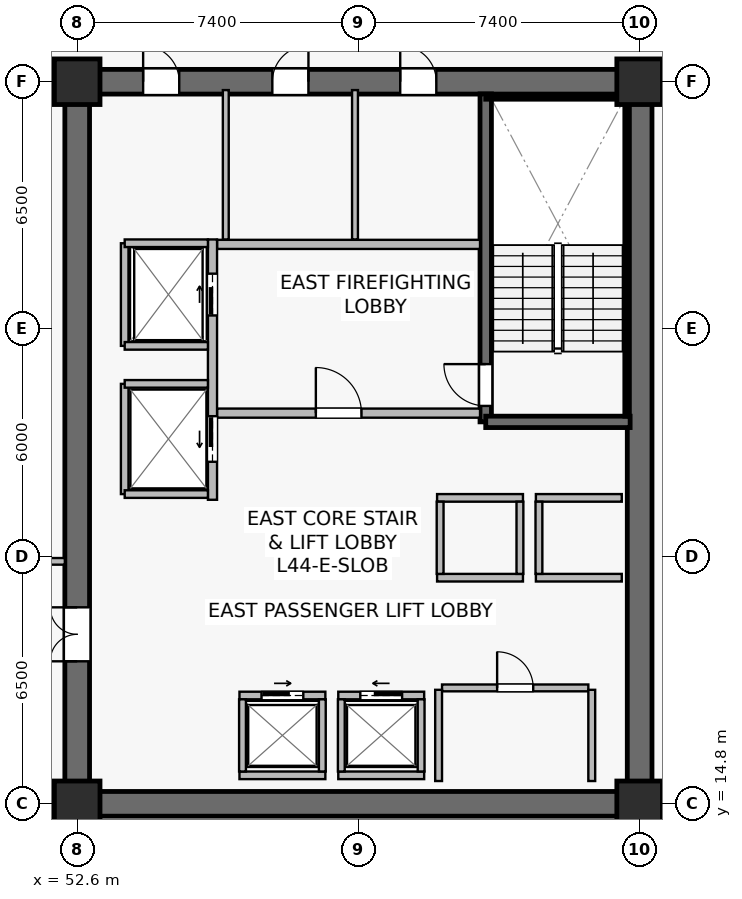
"""IFC4 building model, lengths in metres.
Left out: names, types, materials, properties, quantities, classifications, styles, units other than length and angle.
Written with IfcOpenShell. Run it as: python <this file> out.ifc"""

import sys

from ifc_helpers import new_model, si_unit, direction, frame, frame_2d, origin, origin_2d, place, context, subcontext, project, spatial, rectangle, extrude, source, transform, mapped, element, fill, save


model = new_model("IFC4")
c1 = context("Model", 3, precision=1e-05, world=origin(), true_north=direction((0.0, 1.0)))
c2 = subcontext(c1, "Body", "Model", "MODEL_VIEW")
j1 = project(units=[si_unit("LENGTHUNIT", "METRE"), si_unit("PLANEANGLEUNIT", "RADIAN")], contexts=[c1])
p1 = place(None, origin())
s1 = spatial("IfcSite", under=j1, at=p1, CompositionType="ELEMENT")
p2 = place(p1, origin())
s2 = spatial("IfcBuilding", under=s1, at=p2, CompositionType="ELEMENT")
p3 = place(p2, frame((0.0, 0.0, 183.0)))
s3 = spatial("IfcBuildingStorey", under=s2, at=p3, CompositionType="ELEMENT", Elevation=183.0)
p4 = place(p3, frame((52.275, 14.8, 0.0), z_axis=(0.0, 0.0, 1.0), x_axis=(1.0, 0.0, 0.0)))
e1 = element("IfcWall", 1, at=p4, inside=s3, PredefinedType="SHEAR", context=c2, shape_type="SweptSolid", body=[
    extrude(rectangle(XDim=15.45, YDim=0.65, at=frame_2d((7.725, 0.0))), origin(), (0.0, 0.0, 1.0), 3.79),
])
p5 = place(p3, frame((52.275, 33.8, 0.0), z_axis=(0.0, 0.0, 1.0), x_axis=(1.0, 0.0, 0.0)))
e2 = element("IfcWall", 2, at=p5, inside=s3, PredefinedType="SHEAR", context=c2, shape_type="SweptSolid", body=[
    extrude(rectangle(XDim=15.45, YDim=0.65, at=frame_2d((7.725, 0.0))), origin(), (0.0, 0.0, 1.0), 3.79),
])
p6 = place(p5, frame((8.825, 0.0, 0.0)))
e3 = element("IfcOpeningElement", 3, at=p6, cuts=e2, PredefinedType="OPENING", context=c2, shape_type="SweptSolid", body=[
    extrude(rectangle(XDim=0.95, YDim=2.15, at=frame_2d((0.475, 1.075))), frame((0.0, 0.335, 0.0), z_axis=(0.0, -1.0, 0.0), x_axis=(1.0, 0.0, 0.0)), (0.0, 0.0, 1.0), 0.67),
])
p7 = place(p5, frame((5.46, 0.0, 0.0)))
e4 = element("IfcOpeningElement", 4, at=p7, cuts=e2, PredefinedType="OPENING", context=c2, shape_type="SweptSolid", body=[
    extrude(rectangle(XDim=0.95, YDim=2.15, at=frame_2d((0.475, 1.075))), frame((0.0, 0.335, 0.0), z_axis=(0.0, -1.0, 0.0), x_axis=(1.0, 0.0, 0.0)), (0.0, 0.0, 1.0), 0.67),
])
p8 = place(p5, frame((2.06, 0.0, 0.0)))
e5 = element("IfcOpeningElement", 5, at=p8, cuts=e2, PredefinedType="OPENING", context=c2, shape_type="SweptSolid", body=[
    extrude(rectangle(XDim=0.95, YDim=2.15, at=frame_2d((0.475, 1.075))), frame((0.0, 0.335, 0.0), z_axis=(0.0, -1.0, 0.0), x_axis=(1.0, 0.0, 0.0)), (0.0, 0.0, 1.0), 0.67),
])
p9 = place(p3, frame((52.6, 15.125, 0.0), z_axis=(0.0, 0.0, 1.0), x_axis=(0.0, 1.0, 0.0)))
e6 = element("IfcWall", 6, at=p9, inside=s3, PredefinedType="SHEAR", context=c2, shape_type="SweptSolid", body=[
    extrude(rectangle(XDim=18.35, YDim=0.65, at=frame_2d((9.175, 0.0))), origin(), (0.0, 0.0, 1.0), 3.79),
])
p10 = place(p9, frame((3.425, 0.0, 0.0)))
e7 = element("IfcOpeningElement", 7, at=p10, cuts=e6, PredefinedType="OPENING", context=c2, shape_type="SweptSolid", body=[
    extrude(rectangle(XDim=1.42, YDim=2.2, at=frame_2d((0.71, 1.1))), frame((0.0, 0.335, 0.0), z_axis=(0.0, -1.0, 0.0), x_axis=(1.0, 0.0, 0.0)), (0.0, 0.0, 1.0), 0.67),
])
p11 = place(p3, frame((67.4, 15.125, 0.0), z_axis=(0.0, 0.0, 1.0), x_axis=(0.0, 1.0, 0.0)))
e8 = element("IfcWall", 8, at=p11, inside=s3, PredefinedType="SHEAR", context=c2, shape_type="SweptSolid", body=[
    extrude(rectangle(XDim=18.35, YDim=0.65, at=frame_2d((9.175, 0.0))), origin(), (0.0, 0.0, 1.0), 3.79),
])
p12 = place(p3, frame((63.35, 24.85, 0.0), z_axis=(0.0, 0.0, 1.0), x_axis=(0.0, 1.0, 0.0)))
e9 = element("IfcWall", 9, at=p12, inside=s3, PredefinedType="SHEAR", context=c2, shape_type="SweptSolid", body=[
    extrude(rectangle(XDim=8.63, YDim=0.3, at=frame_2d((4.315, 0.0))), origin(), (0.0, 0.0, 1.0), 3.79),
])
p13 = place(p12, frame((0.42, 0.0, 0.0)))
e10 = element("IfcOpeningElement", 10, at=p13, cuts=e9, PredefinedType="OPENING", context=c2, shape_type="SweptSolid", body=[
    extrude(rectangle(XDim=1.1, YDim=2.15, at=frame_2d((0.55, 1.075))), frame((0.0, 0.16, 0.0), z_axis=(0.0, -1.0, 0.0), x_axis=(1.0, 0.0, 0.0)), (0.0, 0.0, 1.0), 0.32),
])
p14 = place(p3, frame((63.35, 24.85, 0.0), z_axis=(0.0, 0.0, 1.0), x_axis=(1.0, 0.0, 0.0)))
e11 = element("IfcWall", 11, at=p14, inside=s3, PredefinedType="SHEAR", context=c2, shape_type="SweptSolid", body=[
    extrude(rectangle(XDim=3.8, YDim=0.3, at=frame_2d((1.9, 0.0))), origin(), (0.0, 0.0, 1.0), 3.79),
])
p15 = place(p3, frame((63.35, 33.4, 0.0), z_axis=(0.0, 0.0, 1.0), x_axis=(1.0, 0.0, 0.0)))
e12 = element("IfcWall", 12, at=p15, inside=s3, PredefinedType="SOLIDWALL", context=c2, shape_type="SweptSolid", body=[
    extrude(rectangle(XDim=3.72, YDim=0.12, at=frame_2d((1.86, 0.0))), origin(), (0.0, 0.0, 1.0), 3.79),
])
p16 = place(p3, frame((67.07, 25.0, 0.0), z_axis=(0.0, 0.0, 1.0), x_axis=(0.0, 1.0, 0.0)))
e13 = element("IfcWall", 13, at=p16, inside=s3, PredefinedType="SOLIDWALL", context=c2, shape_type="SweptSolid", body=[
    extrude(rectangle(XDim=8.32, YDim=0.12, at=frame_2d((4.16, 0.0))), origin(), (0.0, 0.0, 1.0), 3.79),
])
m1 = source(origin(), c2, "Body", "SweptSolid", [
    extrude(rectangle(XDim=1.2, YDim=1.2, at=origin_2d()), origin(), (0.0, 0.0, 1.0), 4.1),
])
for number, where, z_axis, x_axis in (
    (14, (52.6, 14.8, 0.0), (0.0, 0.0, 1.0), (1.0, 0.0, 0.0)),
    (15, (67.4, 14.8, 0.0), (0.0, 0.0, 1.0), (1.0, 0.0, 0.0)),
    (16, (52.6, 33.8, 0.0), (0.0, 0.0, 1.0), (1.0, 0.0, 0.0)),
    (17, (67.4, 33.8, 0.0), (0.0, 0.0, 1.0), (1.0, 0.0, 0.0)),
):
    element("IfcColumn", number, at=place(p3, frame(where, z_axis=z_axis, x_axis=x_axis)), inside=s3, PredefinedType="COLUMN", context=c2, shape_type="MappedRepresentation", body=[
        mapped(m1, transform((0.0, 0.0, 0.0), scale=1.0)),
    ])
p17 = place(p3, frame((56.28, 25.08, 0.0), z_axis=(0.0, 0.0, 1.0), x_axis=(1.0, 0.0, 0.0)))
e18 = element("IfcWall", 18, at=p17, inside=s3, PredefinedType="SOLIDWALL", context=c2, shape_type="SweptSolid", body=[
    extrude(rectangle(XDim=6.92, YDim=0.24, at=frame_2d((3.46, 0.0))), origin(), (0.0, 0.0, 1.0), 3.187),
])
p18 = place(p17, frame((2.6, 0.0, 0.0)))
e19 = element("IfcOpeningElement", 19, at=p18, cuts=e18, PredefinedType="OPENING", context=c2, shape_type="SweptSolid", body=[
    extrude(rectangle(XDim=1.2, YDim=2.16, at=frame_2d((0.6, 1.08))), frame((0.0, 0.13, 0.0), z_axis=(0.0, -1.0, 0.0), x_axis=(1.0, 0.0, 0.0)), (0.0, 0.0, 1.0), 0.26),
])
p19 = place(p3, frame((56.28, 29.52, 0.0), z_axis=(0.0, 0.0, 1.0), x_axis=(1.0, 0.0, 0.0)))
e20 = element("IfcWall", 20, at=p19, inside=s3, PredefinedType="SOLIDWALL", context=c2, shape_type="SweptSolid", body=[
    extrude(rectangle(XDim=6.92, YDim=0.24, at=frame_2d((3.46, 0.0))), origin(), (0.0, 0.0, 1.0), 3.187),
])
p20 = place(p3, frame((56.16, 22.8, 0.0), z_axis=(0.0, 0.0, 1.0), x_axis=(0.0, 1.0, 0.0)))
e21 = element("IfcWall", 21, at=p20, inside=s3, PredefinedType="SOLIDWALL", context=c2, shape_type="SweptSolid", body=[
    extrude(rectangle(XDim=6.85, YDim=0.24, at=frame_2d((3.425, 0.0))), origin(), (0.0, 0.0, 1.0), 2.925),
])
p21 = place(p20, frame((4.85, 0.0, 0.0)))
e22 = element("IfcOpeningElement", 22, at=p21, cuts=e21, PredefinedType="OPENING", context=c2, shape_type="SweptSolid", body=[
    extrude(rectangle(XDim=1.1, YDim=2.22, at=frame_2d((0.55, 1.11))), frame((0.0, 0.13, 0.0), z_axis=(0.0, -1.0, 0.0), x_axis=(1.0, 0.0, 0.0)), (0.0, 0.0, 1.0), 0.26),
])
p22 = place(p20, frame((1.0, 0.0, 0.0)))
e23 = element("IfcOpeningElement", 23, at=p22, cuts=e21, PredefinedType="OPENING", context=c2, shape_type="SweptSolid", body=[
    extrude(rectangle(XDim=1.2, YDim=2.22, at=frame_2d((0.6, 1.11))), frame((0.0, 0.13, 0.0), z_axis=(0.0, -1.0, 0.0), x_axis=(1.0, 0.0, 0.0)), (0.0, 0.0, 1.0), 0.26),
])
p23 = place(p3, frame((59.47, 17.65, 0.0), z_axis=(0.0, 0.0, 1.0), x_axis=(1.0, 0.0, 0.0)))
e24 = element("IfcWall", 24, at=p23, inside=s3, PredefinedType="SOLIDWALL", context=c2, shape_type="SweptSolid", body=[
    extrude(rectangle(XDim=2.26, YDim=0.2, at=frame_2d((1.13, 0.0))), origin(), (0.0, 0.0, 1.0), 3.187),
])
p24 = place(p23, frame((0.58, 0.0, 0.0)))
e25 = element("IfcOpeningElement", 25, at=p24, cuts=e24, PredefinedType="OPENING", context=c2, shape_type="SweptSolid", body=[
    extrude(rectangle(XDim=1.1, YDim=2.22, at=frame_2d((0.55, 1.11))), frame((0.0, 0.11, 0.0), z_axis=(0.0, -1.0, 0.0), x_axis=(1.0, 0.0, 0.0)), (0.0, 0.0, 1.0), 0.22),
])
p25 = place(p3, frame((59.47, 15.55, 0.0), z_axis=(0.0, 0.0, 1.0), x_axis=(1.0, 0.0, 0.0)))
e26 = element("IfcWall", 26, at=p25, inside=s3, PredefinedType="SOLIDWALL", context=c2, shape_type="SweptSolid", body=[
    extrude(rectangle(XDim=2.26, YDim=0.2, at=frame_2d((1.13, 0.0))), origin(), (0.0, 0.0, 1.0), 3.187),
])
for number, where, z_axis, x_axis in (
    (27, (59.55, 15.65, 0.0), (0.0, 0.0, 1.0), (0.0, 1.0, 0.0)),
    (28, (61.65, 15.65, 0.0), (0.0, 0.0, 1.0), (0.0, 1.0, 0.0)),
):
    element("IfcWall", number, at=place(p3, frame(where, z_axis=z_axis, x_axis=x_axis)), inside=s3, PredefinedType="SOLIDWALL", context=c2, shape_type="SweptSolid", body=[
        extrude(rectangle(XDim=1.9, YDim=0.18, at=frame_2d((0.95, 0.0))), origin(), (0.0, 0.0, 1.0), 3.79),
    ])
p26 = place(p3, frame((56.87, 17.65, 0.0), z_axis=(0.0, 0.0, 1.0), x_axis=(1.0, 0.0, 0.0)))
e29 = element("IfcWall", 29, at=p26, inside=s3, PredefinedType="SOLIDWALL", context=c2, shape_type="SweptSolid", body=[
    extrude(rectangle(XDim=2.26, YDim=0.2, at=frame_2d((1.13, 0.0))), origin(), (0.0, 0.0, 1.0), 3.79),
])
p27 = place(p26, frame((0.58, 0.0, 0.0)))
e30 = element("IfcOpeningElement", 30, at=p27, cuts=e29, PredefinedType="OPENING", context=c2, shape_type="SweptSolid", body=[
    extrude(rectangle(XDim=1.1, YDim=2.22, at=frame_2d((0.55, 1.11))), frame((0.0, 0.11, 0.0), z_axis=(0.0, -1.0, 0.0), x_axis=(1.0, 0.0, 0.0)), (0.0, 0.0, 1.0), 0.22),
])
p28 = place(p3, frame((56.87, 15.55, 0.0), z_axis=(0.0, 0.0, 1.0), x_axis=(1.0, 0.0, 0.0)))
e31 = element("IfcWall", 31, at=p28, inside=s3, PredefinedType="SOLIDWALL", context=c2, shape_type="SweptSolid", body=[
    extrude(rectangle(XDim=2.26, YDim=0.2, at=frame_2d((1.13, 0.0))), origin(), (0.0, 0.0, 1.0), 3.79),
])
for number, where, z_axis, x_axis in (
    (32, (56.95, 15.65, 0.0), (0.0, 0.0, 1.0), (0.0, 1.0, 0.0)),
    (33, (59.05, 15.65, 0.0), (0.0, 0.0, 1.0), (0.0, 1.0, 0.0)),
):
    element("IfcWall", number, at=place(p3, frame(where, z_axis=z_axis, x_axis=x_axis)), inside=s3, PredefinedType="SOLIDWALL", context=c2, shape_type="SweptSolid", body=[
        extrude(rectangle(XDim=1.9, YDim=0.18, at=frame_2d((0.95, 0.0))), origin(), (0.0, 0.0, 1.0), 3.79),
    ])
for number, where, z_axis, x_axis in (
    (34, (64.67, 20.75, 0.0), (0.0, 0.0, 1.0), (1.0, 0.0, 0.0)),
    (35, (64.67, 22.85, 0.0), (0.0, 0.0, 1.0), (1.0, 0.0, 0.0)),
):
    element("IfcWall", number, at=place(p3, frame(where, z_axis=z_axis, x_axis=x_axis)), inside=s3, PredefinedType="SOLIDWALL", context=c2, shape_type="SweptSolid", body=[
        extrude(rectangle(XDim=2.26, YDim=0.2, at=frame_2d((1.13, 0.0))), origin(), (0.0, 0.0, 1.0), 3.79),
    ])
p29 = place(p3, frame((64.75, 20.85, 0.0), z_axis=(0.0, 0.0, 1.0), x_axis=(0.0, 1.0, 0.0)))
e36 = element("IfcWall", 36, at=p29, inside=s3, PredefinedType="SOLIDWALL", context=c2, shape_type="SweptSolid", body=[
    extrude(rectangle(XDim=1.9, YDim=0.18, at=frame_2d((0.95, 0.0))), origin(), (0.0, 0.0, 1.0), 3.79),
])
for number, where, z_axis, x_axis in (
    (37, (62.07, 20.75, 0.0), (0.0, 0.0, 1.0), (1.0, 0.0, 0.0)),
    (38, (62.07, 22.85, 0.0), (0.0, 0.0, 1.0), (1.0, 0.0, 0.0)),
):
    element("IfcWall", number, at=place(p3, frame(where, z_axis=z_axis, x_axis=x_axis)), inside=s3, PredefinedType="SOLIDWALL", context=c2, shape_type="SweptSolid", body=[
        extrude(rectangle(XDim=2.26, YDim=0.2, at=frame_2d((1.13, 0.0))), origin(), (0.0, 0.0, 1.0), 3.79),
    ])
for number, where, z_axis, x_axis in (
    (39, (62.15, 20.85, 0.0), (0.0, 0.0, 1.0), (0.0, 1.0, 0.0)),
    (40, (64.25, 20.85, 0.0), (0.0, 0.0, 1.0), (0.0, 1.0, 0.0)),
):
    element("IfcWall", number, at=place(p3, frame(where, z_axis=z_axis, x_axis=x_axis)), inside=s3, PredefinedType="SOLIDWALL", context=c2, shape_type="SweptSolid", body=[
        extrude(rectangle(XDim=1.9, YDim=0.18, at=frame_2d((0.95, 0.0))), origin(), (0.0, 0.0, 1.0), 3.79),
    ])
p30 = place(p3, frame((53.85, 26.85, 0.0), z_axis=(0.0, 0.0, 1.0), x_axis=(0.0, 1.0, 0.0)))
e41 = element("IfcWall", 41, at=p30, inside=s3, PredefinedType="SOLIDWALL", context=c2, shape_type="SweptSolid", body=[
    extrude(rectangle(XDim=2.7, YDim=0.2, at=frame_2d((1.35, 0.0))), origin(), (0.0, 0.0, 1.0), 3.79),
])
p31 = place(p3, frame((53.85, 29.55, 0.0), z_axis=(0.0, 0.0, 1.0), x_axis=(1.0, 0.0, 0.0)))
e42 = element("IfcWall", 42, at=p31, inside=s3, PredefinedType="SOLIDWALL", context=c2, shape_type="SweptSolid", body=[
    extrude(rectangle(XDim=2.19, YDim=0.2, at=frame_2d((1.095, 0.0))), origin(), (0.0, 0.0, 1.0), 3.79),
])
p32 = place(p3, frame((53.85, 26.85, 0.0), z_axis=(0.0, 0.0, 1.0), x_axis=(1.0, 0.0, 0.0)))
e43 = element("IfcWall", 43, at=p32, inside=s3, PredefinedType="SOLIDWALL", context=c2, shape_type="SweptSolid", body=[
    extrude(rectangle(XDim=2.19, YDim=0.2, at=frame_2d((1.095, 0.0))), origin(), (0.0, 0.0, 1.0), 3.187),
])
p33 = place(p3, frame((53.85, 22.95, 0.0), z_axis=(0.0, 0.0, 1.0), x_axis=(0.0, 1.0, 0.0)))
e44 = element("IfcWall", 44, at=p33, inside=s3, PredefinedType="SOLIDWALL", context=c2, shape_type="SweptSolid", body=[
    extrude(rectangle(XDim=2.9, YDim=0.2, at=frame_2d((1.45, 0.0))), origin(), (0.0, 0.0, 1.0), 2.925),
])
for number, where, z_axis, x_axis in (
    (45, (53.85, 25.85, 0.0), (0.0, 0.0, 1.0), (1.0, 0.0, 0.0)),
    (46, (53.85, 22.95, 0.0), (0.0, 0.0, 1.0), (1.0, 0.0, 0.0)),
):
    element("IfcWall", number, at=place(p3, frame(where, z_axis=z_axis, x_axis=x_axis)), inside=s3, PredefinedType="SOLIDWALL", context=c2, shape_type="SweptSolid", body=[
        extrude(rectangle(XDim=2.19, YDim=0.2, at=frame_2d((1.095, 0.0))), origin(), (0.0, 0.0, 1.0), 3.79),
    ])
p34 = place(p3, frame((62.2, 17.85, 0.0), z_axis=(0.0, 0.0, 1.0), x_axis=(1.0, 0.0, 0.0)))
e47 = element("IfcWall", 47, at=p34, inside=s3, PredefinedType="SOLIDWALL", context=c2, shape_type="SweptSolid", body=[
    extrude(rectangle(XDim=3.85, YDim=0.18, at=frame_2d((1.925, 0.0))), origin(), (0.0, 0.0, 1.0), 3.79),
])
p35 = place(p34, frame((1.45, 0.0, 0.0)))
e48 = element("IfcOpeningElement", 48, at=p35, cuts=e47, PredefinedType="OPENING", context=c2, shape_type="SweptSolid", body=[
    extrude(rectangle(XDim=0.95, YDim=2.15, at=frame_2d((0.475, 1.075))), frame((0.0, 0.1, 0.0), z_axis=(0.0, -1.0, 0.0), x_axis=(1.0, 0.0, 0.0)), (0.0, 0.0, 1.0), 0.2),
])
for number, where, z_axis, x_axis in (
    (49, (62.11, 15.4, 0.0), (0.0, 0.0, 1.0), (0.0, 1.0, 0.0)),
    (50, (66.14, 15.4, 0.0), (0.0, 0.0, 1.0), (0.0, 1.0, 0.0)),
):
    element("IfcWall", number, at=place(p3, frame(where, z_axis=z_axis, x_axis=x_axis)), inside=s3, PredefinedType="SOLIDWALL", context=c2, shape_type="SweptSolid", body=[
        extrude(rectangle(XDim=2.4, YDim=0.18, at=frame_2d((1.2, 0.0))), origin(), (0.0, 0.0, 1.0), 3.79),
    ])
p36 = place(p3, frame((59.91, 29.65, 0.0), z_axis=(0.0, 0.0, 1.0), x_axis=(0.0, 1.0, 0.0)))
e51 = element("IfcWall", 51, at=p36, inside=s3, PredefinedType="PLUMBINGWALL", context=c2, shape_type="SweptSolid", body=[
    extrude(rectangle(XDim=3.93, YDim=0.155, at=frame_2d((1.965, 0.0))), origin(), (0.0, 0.0, 1.0), 3.187),
])
p37 = place(p3, frame((56.51, 29.65, 0.0), z_axis=(0.0, 0.0, 1.0), x_axis=(0.0, 1.0, 0.0)))
e52 = element("IfcWall", 52, at=p37, inside=s3, PredefinedType="PLUMBINGWALL", context=c2, shape_type="SweptSolid", body=[
    extrude(rectangle(XDim=3.93, YDim=0.155, at=frame_2d((1.965, 0.0))), origin(), (0.0, 0.0, 1.0), 3.79),
])
p38 = place(p3, frame((48.3, 34.26, 0.0), z_axis=(0.0, 0.0, 1.0), x_axis=(1.0, 0.0, 0.0)))
e53 = element("IfcWall", 53, at=p38, inside=s3, PredefinedType="PARTITIONING", context=c2, shape_type="SweptSolid", body=[
    extrude(rectangle(XDim=3.975, YDim=0.175, at=frame_2d((1.987, 0.0))), origin(), (0.0, 0.0, 1.0), 3.475),
])
p39 = place(p3, frame((48.3, 21.18, 0.0), z_axis=(0.0, 0.0, 1.0), x_axis=(1.0, 0.0, 0.0)))
e54 = element("IfcWall", 54, at=p39, inside=s3, PredefinedType="PARTITIONING", context=c2, shape_type="SweptSolid", body=[
    extrude(rectangle(XDim=3.975, YDim=0.175, at=frame_2d((1.987, 0.0))), origin(), (0.0, 0.0, 1.0), 3.79),
])
p40 = place(p39, frame((1.35, 0.0, 0.0)))
e55 = element("IfcOpeningElement", 55, at=p40, cuts=e54, PredefinedType="OPENING", context=c2, shape_type="SweptSolid", body=[
    extrude(rectangle(XDim=0.95, YDim=2.15, at=frame_2d((0.475, 1.075))), frame((0.0, 0.098, 0.0), z_axis=(0.0, -1.0, 0.0), x_axis=(1.0, 0.0, 0.0)), (0.0, 0.0, 1.0), 0.195),
])
m2 = source(origin(), c2, "Body", "SweptSolid", [
    extrude(rectangle(XDim=1.1, YDim=2.15, at=frame_2d((0.55, 1.075))), frame((0.0, 0.025, 0.0), z_axis=(0.0, -1.0, 0.0), x_axis=(1.0, 0.0, 0.0)), (0.0, 0.0, 1.0), 0.05),
])
p41 = place(p13, origin())
e56 = element("IfcDoor", 56, at=p41, inside=s3, OperationType="SINGLE_SWING_RIGHT", PredefinedType="DOOR", context=c2, shape_type="MappedRepresentation", body=[
    mapped(m2, transform((0.0, 0.0, 0.0), scale=1.0)),
])
fill(e10, e56)
m3 = source(origin(), c2, "Body", "SweptSolid", [
    extrude(rectangle(XDim=1.2, YDim=2.16, at=frame_2d((0.6, 1.08))), frame((0.0, 0.025, 0.0), z_axis=(0.0, -1.0, 0.0), x_axis=(1.0, 0.0, 0.0)), (0.0, 0.0, 1.0), 0.05),
])
p42 = place(p18, origin())
e57 = element("IfcDoor", 57, at=p42, inside=s3, OperationType="SINGLE_SWING_LEFT", PredefinedType="DOOR", context=c2, shape_type="MappedRepresentation", body=[
    mapped(m3, transform((0.0, 0.0, 0.0), scale=1.0)),
])
fill(e19, e57)
m4 = source(origin(), c2, "Body", "SweptSolid", [
    extrude(rectangle(XDim=1.1, YDim=2.22, at=frame_2d((0.55, 1.11))), frame((0.0, 0.025, 0.0), z_axis=(0.0, -1.0, 0.0), x_axis=(1.0, 0.0, 0.0)), (0.0, 0.0, 1.0), 0.05),
])
p43 = place(p24, origin())
e58 = element("IfcDoor", 58, at=p43, inside=s3, OperationType="SLIDING_TO_LEFT", PredefinedType="USERDEFINED", context=c2, shape_type="MappedRepresentation", body=[
    mapped(m4, transform((0.0, 0.0, 0.0), scale=1.0)),
])
fill(e25, e58)
p44 = place(p27, origin())
e59 = element("IfcDoor", 59, at=p44, inside=s3, OperationType="SLIDING_TO_RIGHT", PredefinedType="USERDEFINED", context=c2, shape_type="MappedRepresentation", body=[
    mapped(m4, transform((0.0, 0.0, 0.0), scale=1.0)),
])
fill(e30, e59)
p45 = place(p21, origin())
e60 = element("IfcDoor", 60, at=p45, inside=s3, OperationType="SLIDING_TO_RIGHT", PredefinedType="USERDEFINED", context=c2, shape_type="MappedRepresentation", body=[
    mapped(m4, transform((0.0, 0.0, 0.0), scale=1.0)),
])
fill(e22, e60)
m5 = source(origin(), c2, "Body", "SweptSolid", [
    extrude(rectangle(XDim=1.2, YDim=2.22, at=frame_2d((0.6, 1.11))), frame((0.0, 0.025, 0.0), z_axis=(0.0, -1.0, 0.0), x_axis=(1.0, 0.0, 0.0)), (0.0, 0.0, 1.0), 0.05),
])
p46 = place(p22, origin())
e61 = element("IfcDoor", 61, at=p46, inside=s3, OperationType="SLIDING_TO_LEFT", PredefinedType="USERDEFINED", context=c2, shape_type="MappedRepresentation", body=[
    mapped(m5, transform((0.0, 0.0, 0.0), scale=1.0)),
])
fill(e23, e61)
m6 = source(origin(), c2, "Body", "SweptSolid", [
    extrude(rectangle(XDim=0.95, YDim=2.15, at=frame_2d((0.475, 1.075))), frame((0.0, 0.025, 0.0), z_axis=(0.0, -1.0, 0.0), x_axis=(1.0, 0.0, 0.0)), (0.0, 0.0, 1.0), 0.05),
])
p47 = place(p35, origin())
e62 = element("IfcDoor", 62, at=p47, inside=s3, OperationType="SINGLE_SWING_LEFT", PredefinedType="DOOR", context=c2, shape_type="MappedRepresentation", body=[
    mapped(m6, transform((0.0, 0.0, 0.0), scale=1.0)),
])
fill(e48, e62)
m7 = source(origin(), c2, "Body", "SweptSolid", [
    extrude(rectangle(XDim=1.42, YDim=2.2, at=frame_2d((0.71, 1.1))), frame((0.0, 0.025, 0.0), z_axis=(0.0, -1.0, 0.0), x_axis=(1.0, 0.0, 0.0)), (0.0, 0.0, 1.0), 0.05),
])
p48 = place(p10, origin())
e63 = element("IfcDoor", 63, at=p48, inside=s3, OperationType="DOUBLE_DOOR_SINGLE_SWING", PredefinedType="DOOR", context=c2, shape_type="MappedRepresentation", body=[
    mapped(m7, transform((0.0, 0.0, 0.0), scale=1.0)),
])
fill(e7, e63)
p49 = place(p6, origin())
e64 = element("IfcDoor", 64, at=p49, inside=s3, OperationType="SINGLE_SWING_LEFT", PredefinedType="DOOR", context=c2, shape_type="MappedRepresentation", body=[
    mapped(m6, transform((0.0, 0.0, 0.0), scale=1.0)),
])
fill(e3, e64)
p50 = place(p7, origin())
e65 = element("IfcDoor", 65, at=p50, inside=s3, OperationType="SINGLE_SWING_RIGHT", PredefinedType="DOOR", context=c2, shape_type="MappedRepresentation", body=[
    mapped(m6, transform((0.0, 0.0, 0.0), scale=1.0)),
])
fill(e4, e65)
p51 = place(p8, origin())
e66 = element("IfcDoor", 66, at=p51, inside=s3, OperationType="SINGLE_SWING_LEFT", PredefinedType="DOOR", context=c2, shape_type="MappedRepresentation", body=[
    mapped(m6, transform((0.0, 0.0, 0.0), scale=1.0)),
])
fill(e5, e66)
save(model, sys.argv[1])
